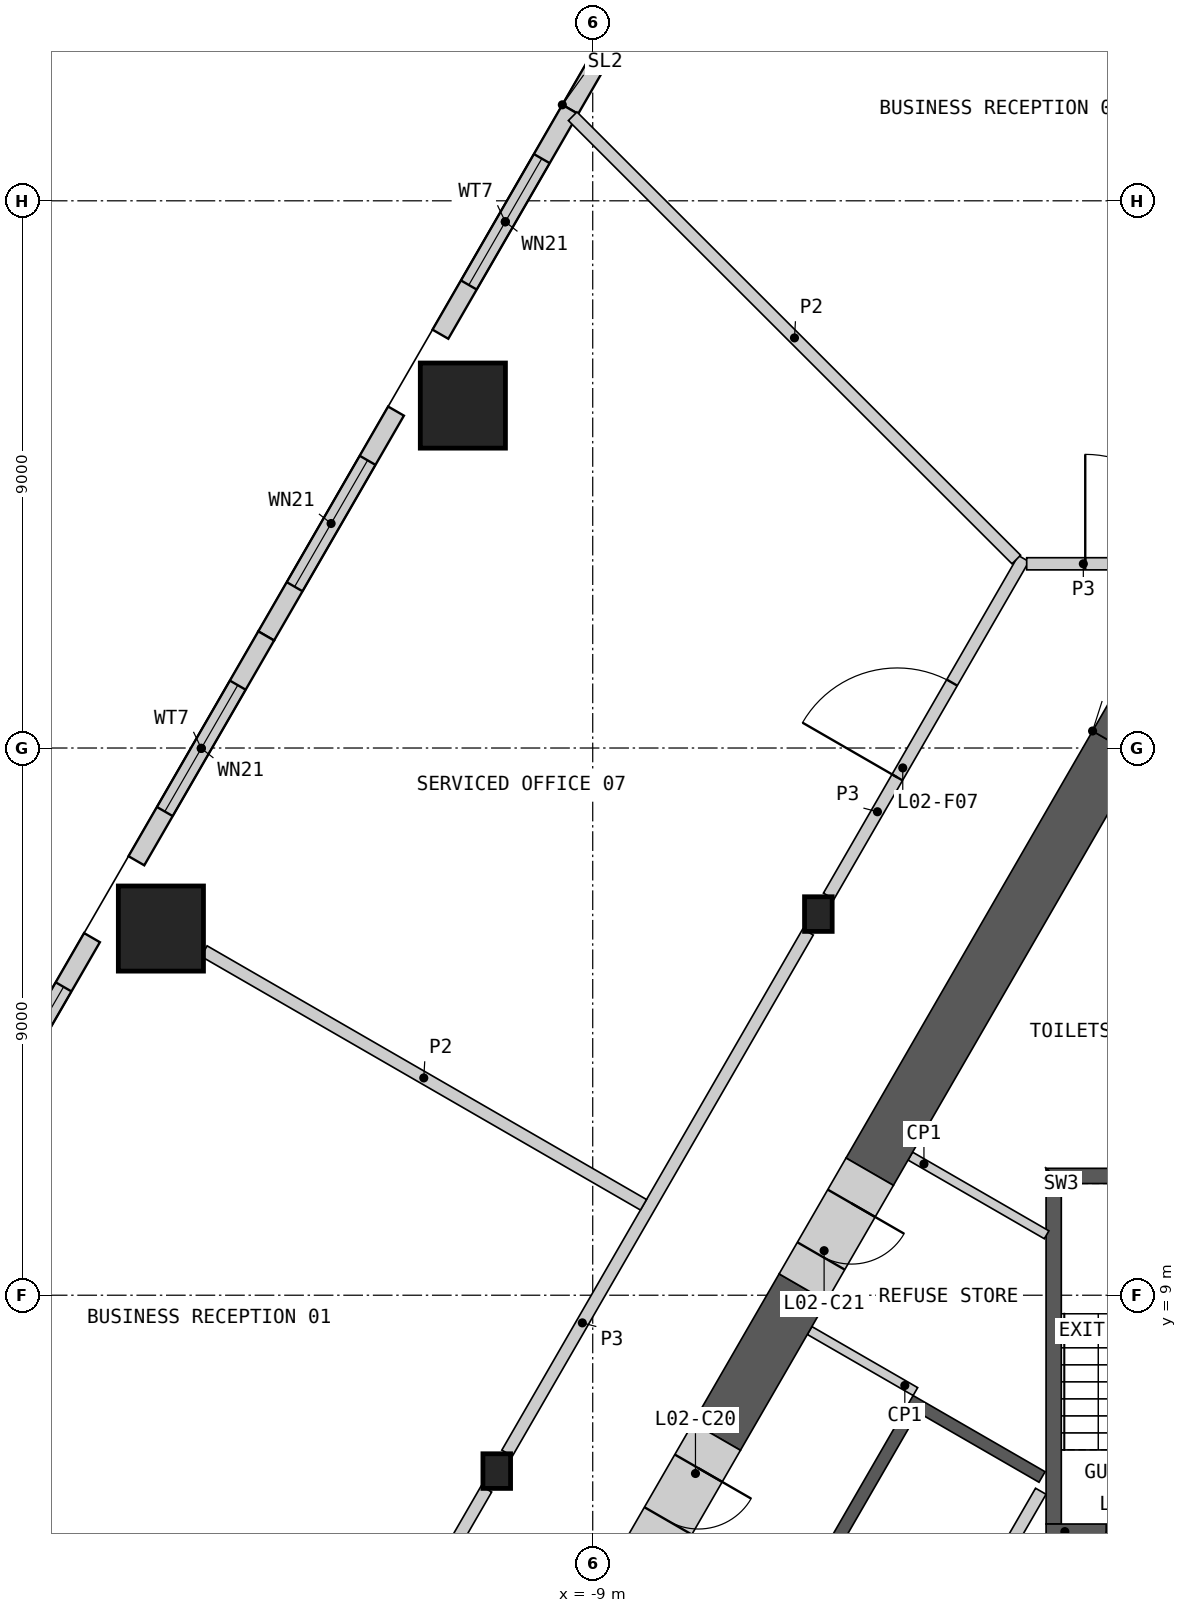
"""IFC4 building model, lengths in metres.
Left out: names, types, materials, properties, quantities, classifications, styles, units other than length and angle.
Written with IfcOpenShell. Run it as: python <this file> out.ifc"""

import sys

from ifc_helpers import new_model, si_unit, direction, frame, frame_2d, origin, origin_2d, place, context, subcontext, project, spatial, polyline, rectangle, hollow_rectangle, i_section, outline, extrude, element, fill, save


model = new_model("IFC4")
c1 = context("Model", 3, precision=1e-05, world=origin(), true_north=direction((0.0, 1.0)))
c2 = subcontext(c1, "Body", "Model", "MODEL_VIEW")
j1 = project(units=[si_unit("LENGTHUNIT", "METRE"), si_unit("PLANEANGLEUNIT", "RADIAN")], contexts=[c1])
p1 = place(None, origin())
s1 = spatial("IfcSite", under=j1, at=p1, CompositionType="ELEMENT")
p2 = place(p1, origin())
s2 = spatial("IfcBuilding", under=s1, at=p2, CompositionType="ELEMENT")
p3 = place(p2, frame((0.0, 0.0, 15.5)))
s3 = spatial("IfcBuildingStorey", under=s2, at=p3, CompositionType="ELEMENT", Elevation=15.5)
for number, where, z_axis, x_axis in (
    (1, (-11.136, 23.632, 0.0), (0.0, 0.0, 1.0), (1.0, 0.0, 0.0)),
    (2, (-16.102, 15.031, 0.0), (0.0, 0.0, 1.0), (1.0, 0.0, 0.0)),
):
    element("IfcColumn", number, at=place(p3, frame(where, z_axis=z_axis, x_axis=x_axis)), inside=s3, PredefinedType="COLUMN", context=c2, shape_type="SweptSolid", body=[
        extrude(hollow_rectangle(XDim=1.4, YDim=1.4, WallThickness=0.1, at=origin_2d()), origin(), (0.0, 0.0, 1.0), 5.5),
    ])
for number, where, z_axis, x_axis in (
    (3, (-5.289, 15.269, 0.0), (0.0, 0.0, 1.0), (1.0, 0.0, 0.0)),
    (4, (-10.578, 6.107, 0.0), (0.0, 0.0, 1.0), (1.0, 0.0, 0.0)),
):
    element("IfcColumn", number, at=place(p3, frame(where, z_axis=z_axis, x_axis=x_axis)), inside=s3, PredefinedType="COLUMN", context=c2, shape_type="SweptSolid", body=[
        extrude(i_section(OverallWidth=0.454, OverallDepth=0.57, WebThickness=0.078, FlangeThickness=0.125, at=origin_2d()), origin(), (0.0, 0.0, 1.0), 5.5),
    ])
p4 = place(p3, frame((-7.235, 32.202, 0.0), z_axis=(0.0, 0.0, 1.0), x_axis=(-0.500019418418, -0.866014192265, 0.0)))
e5 = element("IfcWall", 5, at=p4, inside=s3, PredefinedType="SOLIDWALL", context=c2, shape_type="SweptSolid", body=[
    extrude(rectangle(XDim=4.27, YDim=0.3, at=frame_2d((2.135, 0.0))), origin(), (0.0, 0.0, 1.0), 5.05),
])
p5 = place(p4, frame((0.935, 0.0, 0.9)))
e6 = element("IfcOpeningElement", 6, at=p5, cuts=e5, PredefinedType="OPENING", context=c2, shape_type="SweptSolid", body=[
    extrude(rectangle(XDim=2.4, YDim=3.0, at=frame_2d((1.2, 1.5))), frame((0.0, 0.16, 0.0), z_axis=(0.0, -1.0, 0.0), x_axis=(1.0, 0.0, 0.0)), (0.0, 0.0, 1.0), 0.32),
])
p6 = place(p3, frame((-9.37, 28.504, 0.0), z_axis=(0.0, 0.0, 1.0), x_axis=(-0.499994660107, -0.866028486751, 0.0)))
e7 = element("IfcWall", 7, at=p6, inside=s3, PredefinedType="SOLIDWALL", context=c2, shape_type="SweptSolid", body=[
    extrude(rectangle(XDim=4.27, YDim=0.3, at=frame_2d((2.135, 0.0))), origin(), (0.0, 0.0, 1.0), 5.05),
])
p7 = place(p6, frame((0.935, 0.0, 0.9)))
e8 = element("IfcOpeningElement", 8, at=p7, cuts=e7, PredefinedType="OPENING", context=c2, shape_type="SweptSolid", body=[
    extrude(rectangle(XDim=2.4, YDim=3.0, at=frame_2d((1.2, 1.5))), frame((0.0, 0.16, 0.0), z_axis=(0.0, -1.0, 0.0), x_axis=(1.0, 0.0, 0.0)), (0.0, 0.0, 1.0), 0.32),
])
p8 = place(p3, frame((-12.235, 23.542, 0.0), z_axis=(0.0, 0.0, 1.0), x_axis=(-0.499994660107, -0.866028486751, 0.0)))
e9 = element("IfcWall", 9, at=p8, inside=s3, PredefinedType="SOLIDWALL", context=c2, shape_type="SweptSolid", body=[
    extrude(rectangle(XDim=4.27, YDim=0.3, at=frame_2d((2.135, 0.0))), origin(), (0.0, 0.0, 1.0), 5.05),
])
p9 = place(p8, frame((0.935, 0.0, 0.9)))
e10 = element("IfcOpeningElement", 10, at=p9, cuts=e9, PredefinedType="OPENING", context=c2, shape_type="SweptSolid", body=[
    extrude(rectangle(XDim=2.4, YDim=3.0, at=frame_2d((1.2, 1.5))), frame((0.0, 0.16, 0.0), z_axis=(0.0, -1.0, 0.0), x_axis=(1.0, 0.0, 0.0)), (0.0, 0.0, 1.0), 0.32),
])
p10 = place(p3, frame((-14.37, 19.844, 0.0), z_axis=(0.0, 0.0, 1.0), x_axis=(-0.500019418418, -0.866014192265, 0.0)))
e11 = element("IfcWall", 11, at=p10, inside=s3, PredefinedType="SOLIDWALL", context=c2, shape_type="SweptSolid", body=[
    extrude(rectangle(XDim=4.27, YDim=0.3, at=frame_2d((2.135, 0.0))), origin(), (0.0, 0.0, 1.0), 5.05),
])
p11 = place(p10, frame((0.935, 0.0, 0.9)))
e12 = element("IfcOpeningElement", 12, at=p11, cuts=e11, PredefinedType="OPENING", context=c2, shape_type="SweptSolid", body=[
    extrude(rectangle(XDim=2.4, YDim=3.0, at=frame_2d((1.2, 1.5))), frame((0.0, 0.16, 0.0), z_axis=(0.0, -1.0, 0.0), x_axis=(1.0, 0.0, 0.0)), (0.0, 0.0, 1.0), 0.32),
])
p12 = place(p3, frame((-17.235, 14.881, 0.0), z_axis=(0.0, 0.0, 1.0), x_axis=(-0.499994660107, -0.866028486751, 0.0)))
e13 = element("IfcWall", 13, at=p12, inside=s3, PredefinedType="SOLIDWALL", context=c2, shape_type="SweptSolid", body=[
    extrude(rectangle(XDim=4.27, YDim=0.3, at=frame_2d((2.135, 0.0))), origin(), (0.0, 0.0, 1.0), 5.05),
])
p13 = place(p12, frame((0.935, 0.0, 0.9)))
e14 = element("IfcOpeningElement", 14, at=p13, cuts=e13, PredefinedType="OPENING", context=c2, shape_type="SweptSolid", body=[
    extrude(rectangle(XDim=2.4, YDim=3.0, at=frame_2d((1.2, 1.5))), frame((0.0, 0.16, 0.0), z_axis=(0.0, -1.0, 0.0), x_axis=(1.0, 0.0, 0.0)), (0.0, 0.0, 1.0), 0.32),
])
p14 = place(p3, origin())
e15 = element("IfcWall", 15, at=p14, inside=s3, PredefinedType="SHEAR", context=c2, shape_type="SweptSolid", body=[
    extrude(outline(polyline([(-4.96, 0.208), (-7.131, 1.461), (-3.731, 7.35), (-1.561, 6.097), (-1.66, 5.924), (-3.652, 7.074), (-5.752, 3.437), (-3.76, 2.287), (-3.861, 2.113), (-5.852, 3.263), (-6.852, 1.531), (-4.861, 0.381), (-4.96, 0.208)])), origin(), (0.0, 0.0, 1.0), 5.05),
])
p15 = place(p3, frame((-1.631, 5.776, 0.0), z_axis=(0.0, 0.0, 1.0), x_axis=(-0.499992876559, -0.866029516466, 0.0)))
e16 = element("IfcWall", 16, at=p15, inside=s3, PredefinedType="SOLIDWALL", context=c2, shape_type="SweptSolid", body=[
    extrude(rectangle(XDim=6.486, YDim=0.2, at=frame_2d((3.243, 0.0))), origin(), (0.0, 0.0, 1.0), 5.05),
])
p16 = place(p15, frame((1.537, 0.0, 0.0)))
e17 = element("IfcOpeningElement", 17, at=p16, cuts=e16, PredefinedType="OPENING", context=c2, shape_type="SweptSolid", body=[
    extrude(rectangle(XDim=0.9, YDim=2.1, at=frame_2d((0.45, 1.05))), frame((0.0, 0.11, 0.0), z_axis=(0.0, -1.0, 0.0), x_axis=(1.0, 0.0, 0.0)), (0.0, 0.0, 1.0), 0.22),
])
p17 = place(p3, origin())
e18 = element("IfcWall", 18, at=p17, inside=s3, PredefinedType="SHEAR", context=c2, shape_type="SweptSolid", body=[
    extrude(outline(polyline([(1.544, 11.087), (-1.544, 11.087), (-1.294, 10.837), (1.294, 10.837), (1.544, 11.087)])), origin(), (0.0, 0.0, 1.0), 5.05),
])
p18 = place(p3, origin())
e19 = element("IfcWall", 19, at=p18, inside=s3, PredefinedType="SHEAR", context=c2, shape_type="SweptSolid", body=[
    extrude(outline(polyline([(-1.294, 10.837), (-1.544, 11.087), (-1.544, 5.237), (-1.294, 5.237), (-1.294, 10.837)])), origin(), (0.0, 0.0, 1.0), 5.05),
])
p19 = place(p3, frame((1.544, 5.112, 0.0), z_axis=(0.0, 0.0, 1.0), x_axis=(-1.0, 0.0, 0.0)))
e20 = element("IfcWall", 20, at=p19, inside=s3, PredefinedType="SHEAR", context=c2, shape_type="SweptSolid", body=[
    extrude(rectangle(XDim=3.088, YDim=0.25, at=frame_2d((1.544, 0.0))), origin(), (0.0, 0.0, 1.0), 5.05),
])
p20 = place(p19, frame((0.994, 0.0, 0.0)))
e21 = element("IfcOpeningElement", 21, at=p20, cuts=e20, PredefinedType="OPENING", context=c2, shape_type="SweptSolid", body=[
    extrude(rectangle(XDim=1.1, YDim=2.1, at=frame_2d((0.55, 1.05))), frame((0.0, 0.135, 0.0), z_axis=(0.0, -1.0, 0.0), x_axis=(1.0, 0.0, 0.0)), (0.0, 0.0, 1.0), 0.27),
])
p21 = place(p3, frame((-3.693, 7.415, 0.0), z_axis=(0.0, 0.0, 1.0), x_axis=(-0.866035824272, 0.499981950752, 0.0)))
e22 = element("IfcWall", 22, at=p21, inside=s3, PredefinedType="PARTITIONING", context=c2, shape_type="SweptSolid", body=[
    extrude(rectangle(XDim=2.009, YDim=0.15, at=frame_2d((1.004, 0.0))), origin(), (0.0, 0.0, 1.0), 5.05),
])
p22 = place(p3, frame((-3.777, 11.288, 0.0), z_axis=(0.0, 0.0, 1.0), x_axis=(0.866011223082, -0.500024560893, 0.0)))
e23 = element("IfcWall", 23, at=p22, inside=s3, PredefinedType="PARTITIONING", context=c2, shape_type="SweptSolid", body=[
    extrude(rectangle(XDim=2.588, YDim=0.15, at=frame_2d((1.294, 0.0))), origin(), (0.0, 0.0, 1.0), 5.05),
])
p23 = place(p3, frame((-0.39, 18.055, 0.0), z_axis=(0.0, 0.0, 1.0), x_axis=(-0.499995201193, -0.866028174359, 0.0)))
e24 = element("IfcWall", 24, at=p23, inside=s3, PredefinedType="SHEAR", context=c2, shape_type="SweptSolid", body=[
    extrude(rectangle(XDim=8.11, YDim=0.9, at=frame_2d((4.055, 0.0))), origin(), (0.0, 0.0, 1.0), 5.05),
])
p24 = place(p3, frame((-5.545, 9.126, 0.0), z_axis=(0.0, 0.0, 1.0), x_axis=(-0.499978737809, -0.866037679168, 0.0)))
e25 = element("IfcWall", 25, at=p24, inside=s3, PredefinedType="SHEAR", context=c2, shape_type="SweptSolid", body=[
    extrude(rectangle(XDim=2.831, YDim=0.9, at=frame_2d((1.416, 0.0))), origin(), (0.0, 0.0, 1.0), 5.05),
])
p25 = place(p3, origin())
e26 = element("IfcWall", 26, at=p25, inside=s3, PredefinedType="SHEAR", context=c2, shape_type="SweptSolid", body=[
    extrude(outline(polyline([(-0.779, 18.28), (0.0, 19.63), (0.779, 18.28), (0.0, 17.83), (-0.779, 18.28)])), origin(), (0.0, 0.0, 1.0), 5.05),
])
p26 = place(p3, frame((-6.96, 6.674, 0.0), z_axis=(0.0, 0.0, 1.0), x_axis=(-0.50002983664, -0.866008176907, 0.0)))
e27 = element("IfcWall", 27, at=p26, inside=s3, PredefinedType="SHEAR", context=c2, shape_type="SweptSolid", body=[
    extrude(rectangle(XDim=2.2, YDim=0.9, at=frame_2d((1.1, 0.0))), origin(), (0.0, 0.0, 1.0), 5.05),
])
p27 = place(p26, frame((0.6, 0.0, 0.0)))
e28 = element("IfcOpeningElement", 28, at=p27, cuts=e27, PredefinedType="OPENING", context=c2, shape_type="SweptSolid", body=[
    extrude(rectangle(XDim=1.0, YDim=2.1, at=frame_2d((0.5, 1.05))), frame((0.0, 0.46, 0.0), z_axis=(0.0, -1.0, 0.0), x_axis=(1.0, 0.0, 0.0)), (0.0, 0.0, 1.0), 0.92),
])
p28 = place(p3, frame((-4.445, 11.031, 0.0), z_axis=(0.0, 0.0, 1.0), x_axis=(-0.50002983664, -0.866008176907, 0.0)))
e29 = element("IfcWall", 29, at=p28, inside=s3, PredefinedType="SHEAR", context=c2, shape_type="SweptSolid", body=[
    extrude(rectangle(XDim=2.2, YDim=0.9, at=frame_2d((1.1, 0.0))), origin(), (0.0, 0.0, 1.0), 5.05),
])
p29 = place(p28, frame((0.6, 0.0, 0.0)))
e30 = element("IfcOpeningElement", 30, at=p29, cuts=e29, PredefinedType="OPENING", context=c2, shape_type="SweptSolid", body=[
    extrude(rectangle(XDim=1.0, YDim=2.1, at=frame_2d((0.5, 1.05))), frame((0.0, 0.46, 0.0), z_axis=(0.0, -1.0, 0.0), x_axis=(1.0, 0.0, 0.0)), (0.0, 0.0, 1.0), 0.92),
])
p30 = place(p3, frame((-10.408, 6.402, 0.0), z_axis=(0.0, 0.0, 1.0), x_axis=(0.499985793049, 0.866033606016, 0.0)))
e31 = element("IfcWall", 31, at=p30, inside=s3, PredefinedType="PARTITIONING", context=c2, shape_type="SweptSolid", body=[
    extrude(rectangle(XDim=9.898, YDim=0.2, at=frame_2d((4.949, 0.0))), origin(), (0.0, 0.0, 1.0), 5.05),
])
p31 = place(p3, frame((-15.634, -2.648, 0.0), z_axis=(0.0, 0.0, 1.0), x_axis=(0.500017363087, 0.866015378969, 0.0)))
e32 = element("IfcWall", 32, at=p31, inside=s3, PredefinedType="PARTITIONING", context=c2, shape_type="SweptSolid", body=[
    extrude(rectangle(XDim=9.77, YDim=0.2, at=frame_2d((4.885, 0.0))), origin(), (0.0, 0.0, 1.0), 5.05),
])
p32 = place(p31, frame((4.086, 0.0, 0.0)))
e33 = element("IfcOpeningElement", 33, at=p32, cuts=e32, PredefinedType="OPENING", context=c2, shape_type="SweptSolid", body=[
    extrude(rectangle(XDim=1.8, YDim=2.1, at=frame_2d((0.9, 1.05))), frame((0.0, 0.11, 0.0), z_axis=(0.0, -1.0, 0.0), x_axis=(1.0, 0.0, 0.0)), (0.0, 0.0, 1.0), 0.22),
])
p33 = place(p3, frame((-5.119, 15.563, 0.0), z_axis=(0.0, 0.0, 1.0), x_axis=(0.500004801114, 0.866022631842, 0.0)))
e34 = element("IfcWall", 34, at=p33, inside=s3, PredefinedType="PARTITIONING", context=c2, shape_type="SweptSolid", body=[
    extrude(rectangle(XDim=6.412, YDim=0.2, at=frame_2d((3.206, 0.0))), origin(), (0.0, 0.0, 1.0), 5.05),
])
p34 = place(p33, frame((2.256, 0.0, 0.0)))
e35 = element("IfcOpeningElement", 35, at=p34, cuts=e34, PredefinedType="OPENING", context=c2, shape_type="SweptSolid", body=[
    extrude(rectangle(XDim=1.8, YDim=2.1, at=frame_2d((0.9, 1.05))), frame((0.0, 0.11, 0.0), z_axis=(0.0, -1.0, 0.0), x_axis=(1.0, 0.0, 0.0)), (0.0, 0.0, 1.0), 0.22),
])
p35 = place(p3, frame((-1.863, 21.03, 0.0), z_axis=(0.0, 0.0, 1.0), x_axis=(1.0, 0.0, 0.0)))
e36 = element("IfcWall", 36, at=p35, inside=s3, PredefinedType="PARTITIONING", context=c2, shape_type="SweptSolid", body=[
    extrude(rectangle(XDim=3.726, YDim=0.2, at=frame_2d((1.863, 0.0))), origin(), (0.0, 0.0, 1.0), 5.05),
])
p36 = place(p35, frame((0.963, 0.0, 0.0)))
e37 = element("IfcOpeningElement", 37, at=p36, cuts=e36, PredefinedType="OPENING", context=c2, shape_type="SweptSolid", body=[
    extrude(rectangle(XDim=1.8, YDim=2.1, at=frame_2d((0.9, 1.05))), frame((0.0, 0.11, 0.0), z_axis=(0.0, -1.0, 0.0), x_axis=(1.0, 0.0, 0.0)), (0.0, 0.0, 1.0), 0.22),
])
p37 = place(p3, frame((-9.33, 28.391, 0.0), z_axis=(0.0, 0.0, 1.0), x_axis=(0.707402604593, -0.706810833968, 0.0)))
e38 = element("IfcWall", 38, at=p37, inside=s3, PredefinedType="PARTITIONING", context=c2, shape_type="SweptSolid", body=[
    extrude(rectangle(XDim=10.314, YDim=0.2, at=frame_2d((5.157, 0.0))), origin(), (0.0, 0.0, 1.0), 5.05),
])
p38 = place(p3, frame((-15.392, 14.66, 0.0), z_axis=(0.0, 0.0, 1.0), x_axis=(0.866027244746, -0.499996811348, 0.0)))
e39 = element("IfcWall", 39, at=p38, inside=s3, PredefinedType="PARTITIONING", context=c2, shape_type="SweptSolid", body=[
    extrude(rectangle(XDim=8.345, YDim=0.2, at=frame_2d((4.172, 0.0))), origin(), (0.0, 0.0, 1.0), 5.05),
])
p39 = place(p5, origin())
e40 = element("IfcWindow", 40, at=p39, inside=s3, PartitioningType="SINGLE_PANEL", PredefinedType="WINDOW", context=c2, shape_type="SweptSolid", body=[
    extrude(rectangle(XDim=2.4, YDim=3.0, at=frame_2d((1.2, 1.5))), frame((0.0, 0.03, 0.0), z_axis=(0.0, -1.0, 0.0), x_axis=(1.0, 0.0, 0.0)), (0.0, 0.0, 1.0), 0.06),
])
fill(e6, e40)
p40 = place(p7, origin())
e41 = element("IfcWindow", 41, at=p40, inside=s3, PartitioningType="SINGLE_PANEL", PredefinedType="WINDOW", context=c2, shape_type="SweptSolid", body=[
    extrude(rectangle(XDim=2.4, YDim=3.0, at=frame_2d((1.2, 1.5))), frame((0.0, 0.03, 0.0), z_axis=(0.0, -1.0, 0.0), x_axis=(1.0, 0.0, 0.0)), (0.0, 0.0, 1.0), 0.06),
])
fill(e8, e41)
p41 = place(p9, origin())
e42 = element("IfcWindow", 42, at=p41, inside=s3, PartitioningType="SINGLE_PANEL", PredefinedType="WINDOW", context=c2, shape_type="SweptSolid", body=[
    extrude(rectangle(XDim=2.4, YDim=3.0, at=frame_2d((1.2, 1.5))), frame((0.0, 0.03, 0.0), z_axis=(0.0, -1.0, 0.0), x_axis=(1.0, 0.0, 0.0)), (0.0, 0.0, 1.0), 0.06),
])
fill(e10, e42)
p42 = place(p11, origin())
e43 = element("IfcWindow", 43, at=p42, inside=s3, PartitioningType="SINGLE_PANEL", PredefinedType="WINDOW", context=c2, shape_type="SweptSolid", body=[
    extrude(rectangle(XDim=2.4, YDim=3.0, at=frame_2d((1.2, 1.5))), frame((0.0, 0.03, 0.0), z_axis=(0.0, -1.0, 0.0), x_axis=(1.0, 0.0, 0.0)), (0.0, 0.0, 1.0), 0.06),
])
fill(e12, e43)
p43 = place(p13, origin())
e44 = element("IfcWindow", 44, at=p43, inside=s3, PartitioningType="SINGLE_PANEL", PredefinedType="WINDOW", context=c2, shape_type="SweptSolid", body=[
    extrude(rectangle(XDim=2.4, YDim=3.0, at=frame_2d((1.2, 1.5))), frame((0.0, 0.03, 0.0), z_axis=(0.0, -1.0, 0.0), x_axis=(1.0, 0.0, 0.0)), (0.0, 0.0, 1.0), 0.06),
])
fill(e14, e44)
p44 = place(p20, origin())
e45 = element("IfcDoor", 45, at=p44, inside=s3, OperationType="SINGLE_SWING_RIGHT", PredefinedType="DOOR", context=c2, shape_type="SweptSolid", body=[
    extrude(rectangle(XDim=1.1, YDim=2.1, at=frame_2d((0.55, 1.05))), frame((0.0, 0.025, 0.0), z_axis=(0.0, -1.0, 0.0), x_axis=(1.0, 0.0, 0.0)), (0.0, 0.0, 1.0), 0.05),
])
fill(e21, e45)
p45 = place(p27, origin())
e46 = element("IfcDoor", 46, at=p45, inside=s3, OperationType="SINGLE_SWING_LEFT", PredefinedType="DOOR", context=c2, shape_type="SweptSolid", body=[
    extrude(rectangle(XDim=1.0, YDim=2.1, at=frame_2d((0.5, 1.05))), frame((0.0, 0.205, 0.0), z_axis=(0.0, -1.0, 0.0), x_axis=(1.0, 0.0, 0.0)), (0.0, 0.0, 1.0), 0.05),
])
fill(e28, e46)
p46 = place(p29, origin())
e47 = element("IfcDoor", 47, at=p46, inside=s3, OperationType="SINGLE_SWING_LEFT", PredefinedType="DOOR", context=c2, shape_type="SweptSolid", body=[
    extrude(rectangle(XDim=1.0, YDim=2.1, at=frame_2d((0.5, 1.05))), frame((0.0, 0.205, 0.0), z_axis=(0.0, -1.0, 0.0), x_axis=(1.0, 0.0, 0.0)), (0.0, 0.0, 1.0), 0.05),
])
fill(e30, e47)
p47 = place(p34, origin())
e48 = element("IfcDoor", 48, at=p47, inside=s3, OperationType="DOUBLE_DOOR_SINGLE_SWING", PredefinedType="DOOR", context=c2, shape_type="SweptSolid", body=[
    extrude(rectangle(XDim=1.8, YDim=2.1, at=frame_2d((0.9, 1.05))), frame((0.0, 0.025, 0.0), z_axis=(0.0, -1.0, 0.0), x_axis=(1.0, 0.0, 0.0)), (0.0, 0.0, 1.0), 0.05),
])
fill(e35, e48)
p48 = place(p36, origin())
e49 = element("IfcDoor", 49, at=p48, inside=s3, OperationType="DOUBLE_DOOR_SINGLE_SWING", PredefinedType="DOOR", context=c2, shape_type="SweptSolid", body=[
    extrude(rectangle(XDim=1.8, YDim=2.1, at=frame_2d((0.9, 1.05))), frame((0.0, 0.025, 0.0), z_axis=(0.0, -1.0, 0.0), x_axis=(1.0, 0.0, 0.0)), (0.0, 0.0, 1.0), 0.05),
])
fill(e37, e49)
save(model, sys.argv[1])
